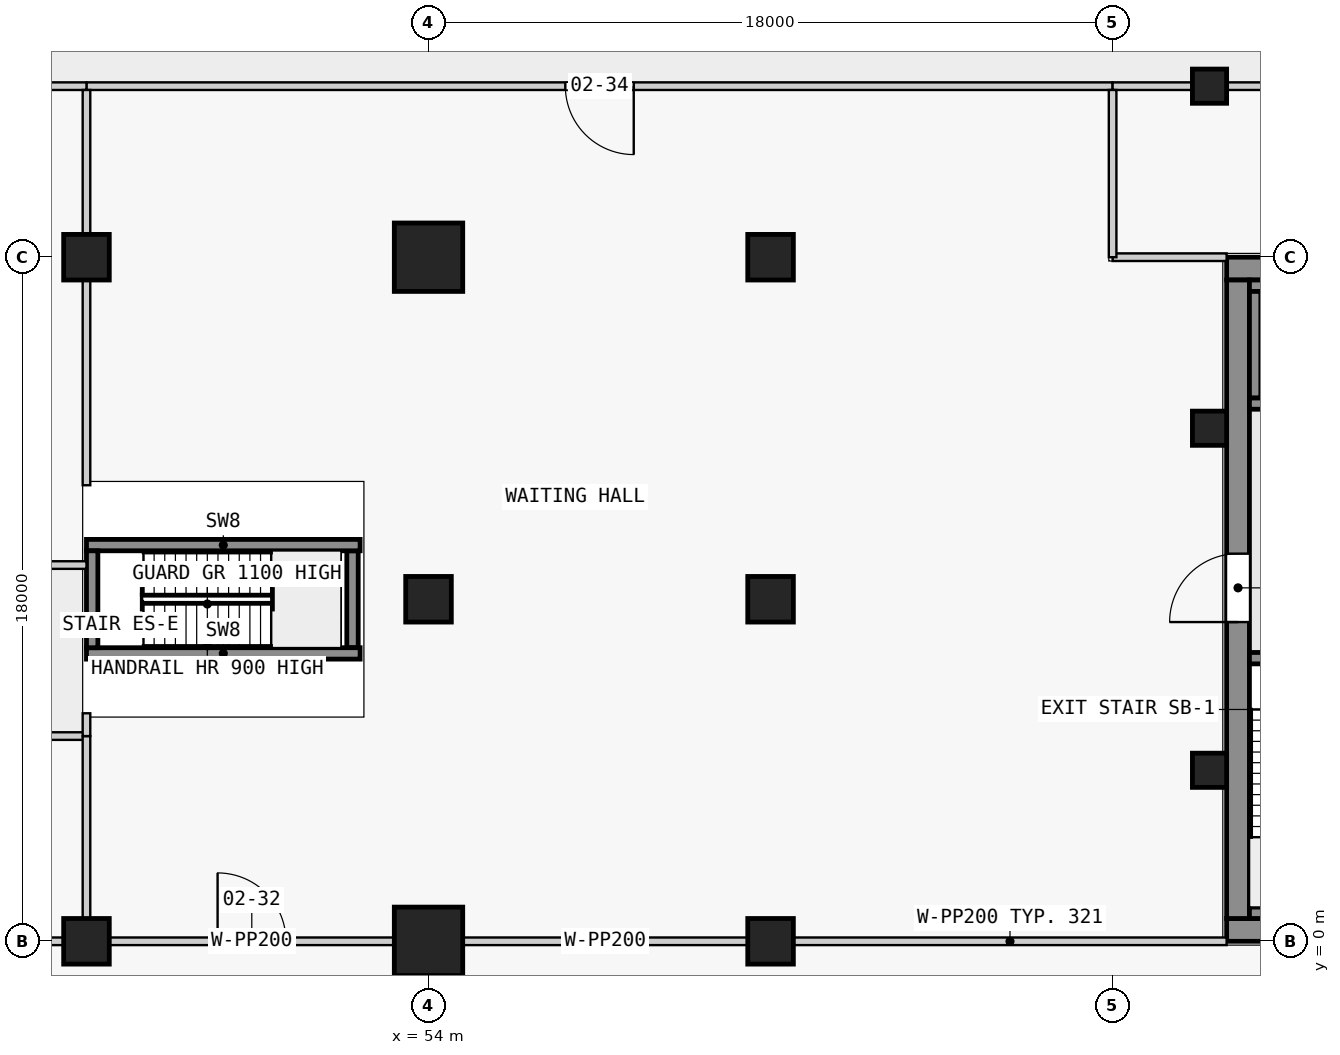
"""IFC4 building model, lengths in metres.
Left out: names, types, materials, properties, quantities, classifications, styles, units other than length and angle.
Written with IfcOpenShell. Run it as: python <this file> out.ifc"""

import sys

from ifc_helpers import new_model, si_unit, direction, frame, frame_2d, origin, origin_2d, place, context, subcontext, project, spatial, rectangle, extrude, element, fill, save


model = new_model("IFC4")
c1 = context("Model", 3, precision=1e-05, world=origin(), true_north=direction((0.0, 1.0)))
c2 = subcontext(c1, "Body", "Model", "MODEL_VIEW")
j1 = project(units=[si_unit("LENGTHUNIT", "METRE"), si_unit("PLANEANGLEUNIT", "RADIAN")], contexts=[c1])
p1 = place(None, origin())
s1 = spatial("IfcSite", under=j1, at=p1, CompositionType="ELEMENT")
p2 = place(p1, origin())
s2 = spatial("IfcBuilding", under=s1, at=p2, CompositionType="ELEMENT")
p3 = place(p2, frame((0.0, 0.0, 12.8)))
s3 = spatial("IfcBuildingStorey", under=s2, at=p3, CompositionType="ELEMENT", Elevation=12.8)
for number, where, z_axis, x_axis in (
    (1, (45.0, 0.0, 0.0), (0.0, 0.0, 1.0), (1.0, 0.0, 0.0)),
    (2, (45.0, 18.0, 0.0), (0.0, 0.0, 1.0), (1.0, 0.0, 0.0)),
):
    element("IfcColumn", number, at=place(p3, frame(where, z_axis=z_axis, x_axis=x_axis)), inside=s3, PredefinedType="COLUMN", context=c2, shape_type="SweptSolid", body=[
        extrude(rectangle(XDim=1.2, YDim=1.2, at=origin_2d()), origin(), (0.0, 0.0, 1.0), 4.5),
    ])
p4 = place(p3, frame((54.0, 0.0, 0.0), z_axis=(0.0, 0.0, 1.0), x_axis=(1.0, 0.0, 0.0)))
e3 = element("IfcColumn", 3, at=p4, inside=s3, PredefinedType="COLUMN", context=c2, shape_type="SweptSolid", body=[
    extrude(rectangle(XDim=1.8, YDim=1.8, at=origin_2d()), origin(), (0.0, 0.0, 1.0), 4.5),
])
p5 = place(p3, frame((54.0, 9.0, 0.0), z_axis=(0.0, 0.0, 1.0), x_axis=(1.0, 0.0, 0.0)))
e4 = element("IfcColumn", 4, at=p5, inside=s3, PredefinedType="COLUMN", context=c2, shape_type="SweptSolid", body=[
    extrude(rectangle(XDim=1.2, YDim=1.2, at=origin_2d()), origin(), (0.0, 0.0, 1.0), 4.5),
])
p6 = place(p3, frame((54.0, 18.0, 0.0), z_axis=(0.0, 0.0, 1.0), x_axis=(1.0, 0.0, 0.0)))
e5 = element("IfcColumn", 5, at=p6, inside=s3, PredefinedType="COLUMN", context=c2, shape_type="SweptSolid", body=[
    extrude(rectangle(XDim=1.8, YDim=1.8, at=origin_2d()), origin(), (0.0, 0.0, 1.0), 4.5),
])
for number, where, z_axis, x_axis in (
    (6, (63.0, 0.0, 0.0), (0.0, 0.0, 1.0), (1.0, 0.0, 0.0)),
    (7, (63.0, 9.0, 0.0), (0.0, 0.0, 1.0), (1.0, 0.0, 0.0)),
    (8, (63.0, 18.0, 0.0), (0.0, 0.0, 1.0), (1.0, 0.0, 0.0)),
):
    element("IfcColumn", number, at=place(p3, frame(where, z_axis=z_axis, x_axis=x_axis)), inside=s3, PredefinedType="COLUMN", context=c2, shape_type="SweptSolid", body=[
        extrude(rectangle(XDim=1.2, YDim=1.2, at=origin_2d()), origin(), (0.0, 0.0, 1.0), 4.5),
    ])
for number, where, z_axis, x_axis in (
    (9, (74.55, 22.5, 0.0), (0.0, 0.0, 1.0), (1.0, 0.0, 0.0)),
    (10, (74.55, 13.5, 0.0), (0.0, 0.0, 1.0), (1.0, 0.0, 0.0)),
    (11, (74.55, 4.5, 0.0), (0.0, 0.0, 1.0), (1.0, 0.0, 0.0)),
):
    element("IfcColumn", number, at=place(p3, frame(where, z_axis=z_axis, x_axis=x_axis)), inside=s3, PredefinedType="COLUMN", context=c2, shape_type="SweptSolid", body=[
        extrude(rectangle(XDim=0.9, YDim=0.9, at=origin_2d()), origin(), (0.0, 0.0, 1.0), 4.5),
    ])
for number, where, z_axis, x_axis in (
    (12, (75.0, 0.3, 0.0), (0.0, 0.0, 1.0), (1.0, 0.0, 0.0)),
    (13, (75.0, 17.7, 0.0), (0.0, 0.0, 1.0), (1.0, 0.0, 0.0)),
):
    element("IfcWall", number, at=place(p3, frame(where, z_axis=z_axis, x_axis=x_axis)), inside=s3, PredefinedType="SHEAR", context=c2, shape_type="SweptSolid", body=[
        extrude(rectangle(XDim=14.5, YDim=0.6, at=frame_2d((7.25, 0.0))), origin(), (0.0, 0.0, 1.0), 4.15),
    ])
p7 = place(p3, frame((75.3, 0.6, 0.0), z_axis=(0.0, 0.0, 1.0), x_axis=(0.0, 1.0, 0.0)))
e14 = element("IfcWall", 14, at=p7, inside=s3, PredefinedType="SHEAR", context=c2, shape_type="SweptSolid", body=[
    extrude(rectangle(XDim=16.8, YDim=0.6, at=frame_2d((8.4, 0.0))), origin(), (0.0, 0.0, 1.0), 4.15),
])
p8 = place(p7, frame((7.8, 0.0, 0.0)))
e15 = element("IfcOpeningElement", 15, at=p8, cuts=e14, PredefinedType="OPENING", context=c2, shape_type="SweptSolid", body=[
    extrude(rectangle(XDim=1.8, YDim=2.1, at=frame_2d((0.9, 1.05))), frame((0.0, 0.31, 0.0), z_axis=(0.0, -1.0, 0.0), x_axis=(1.0, 0.0, 0.0)), (0.0, 0.0, 1.0), 0.62),
])
p9 = place(p3, frame((75.6, 0.75, 0.0), z_axis=(0.0, 0.0, 1.0), x_axis=(1.0, 0.0, 0.0)))
e16 = element("IfcWall", 16, at=p9, inside=s3, PredefinedType="SHEAR", context=c2, shape_type="SweptSolid", body=[
    extrude(rectangle(XDim=5.7, YDim=0.3, at=frame_2d((2.85, 0.0))), origin(), (0.0, 0.0, 1.0), 4.15),
])
p10 = place(p3, frame((75.6, 7.45, 0.0), z_axis=(0.0, 0.0, 1.0), x_axis=(1.0, 0.0, 0.0)))
e17 = element("IfcWall", 17, at=p10, inside=s3, PredefinedType="SHEAR", context=c2, shape_type="SweptSolid", body=[
    extrude(rectangle(XDim=5.7, YDim=0.3, at=frame_2d((2.85, 0.0))), origin(), (0.0, 0.0, 1.0), 4.15),
])
p11 = place(p10, frame((0.75, 0.0, 0.0)))
e18 = element("IfcOpeningElement", 18, at=p11, cuts=e17, PredefinedType="OPENING", context=c2, shape_type="SweptSolid", body=[
    extrude(rectangle(XDim=1.1, YDim=2.1, at=frame_2d((0.55, 1.05))), frame((0.0, 0.16, 0.0), z_axis=(0.0, -1.0, 0.0), x_axis=(1.0, 0.0, 0.0)), (0.0, 0.0, 1.0), 0.32),
])
p12 = place(p10, frame((3.55, 0.0, 0.0)))
e19 = element("IfcOpeningElement", 19, at=p12, cuts=e17, PredefinedType="OPENING", context=c2, shape_type="SweptSolid", body=[
    extrude(rectangle(XDim=1.1, YDim=2.1, at=frame_2d((0.55, 1.05))), frame((0.0, 0.16, 0.0), z_axis=(0.0, -1.0, 0.0), x_axis=(1.0, 0.0, 0.0)), (0.0, 0.0, 1.0), 0.32),
])
p13 = place(p3, frame((75.6, 17.25, 0.0), z_axis=(0.0, 0.0, 1.0), x_axis=(1.0, 0.0, 0.0)))
e20 = element("IfcWall", 20, at=p13, inside=s3, PredefinedType="SHEAR", context=c2, shape_type="SweptSolid", body=[
    extrude(rectangle(XDim=9.9, YDim=0.3, at=frame_2d((4.95, 0.0))), origin(), (0.0, 0.0, 1.0), 4.15),
])
p14 = place(p3, frame((75.6, 14.15, 0.0), z_axis=(0.0, 0.0, 1.0), x_axis=(1.0, 0.0, 0.0)))
e21 = element("IfcWall", 21, at=p14, inside=s3, PredefinedType="SHEAR", context=c2, shape_type="SweptSolid", body=[
    extrude(rectangle(XDim=9.9, YDim=0.3, at=frame_2d((4.95, 0.0))), origin(), (0.0, 0.0, 1.0), 4.15),
])
p15 = place(p14, frame((0.85, 0.0, 0.0)))
e22 = element("IfcOpeningElement", 22, at=p15, cuts=e21, PredefinedType="OPENING", context=c2, shape_type="SweptSolid", body=[
    extrude(rectangle(XDim=1.1, YDim=2.1, at=frame_2d((0.55, 1.05))), frame((0.0, 0.16, 0.0), z_axis=(0.0, -1.0, 0.0), x_axis=(1.0, 0.0, 0.0)), (0.0, 0.0, 1.0), 0.32),
])
p16 = place(p14, frame((3.35, 0.0, 0.0)))
e23 = element("IfcOpeningElement", 23, at=p16, cuts=e21, PredefinedType="OPENING", context=c2, shape_type="SweptSolid", body=[
    extrude(rectangle(XDim=1.1, YDim=2.1, at=frame_2d((0.55, 1.05))), frame((0.0, 0.16, 0.0), z_axis=(0.0, -1.0, 0.0), x_axis=(1.0, 0.0, 0.0)), (0.0, 0.0, 1.0), 0.32),
])
p17 = place(p14, frame((5.75, 0.0, 0.0)))
e24 = element("IfcOpeningElement", 24, at=p17, cuts=e21, PredefinedType="OPENING", context=c2, shape_type="SweptSolid", body=[
    extrude(rectangle(XDim=1.1, YDim=2.1, at=frame_2d((0.55, 1.05))), frame((0.0, 0.16, 0.0), z_axis=(0.0, -1.0, 0.0), x_axis=(1.0, 0.0, 0.0)), (0.0, 0.0, 1.0), 0.32),
])
p18 = place(p14, frame((8.05, 0.0, 0.0)))
e25 = element("IfcOpeningElement", 25, at=p18, cuts=e21, PredefinedType="OPENING", context=c2, shape_type="SweptSolid", body=[
    extrude(rectangle(XDim=1.1, YDim=2.1, at=frame_2d((0.55, 1.05))), frame((0.0, 0.16, 0.0), z_axis=(0.0, -1.0, 0.0), x_axis=(1.0, 0.0, 0.0)), (0.0, 0.0, 1.0), 0.32),
])
p19 = place(p3, frame((75.75, 14.3, 0.0), z_axis=(0.0, 0.0, 1.0), x_axis=(0.0, 1.0, 0.0)))
e26 = element("IfcWall", 26, at=p19, inside=s3, PredefinedType="SHEAR", context=c2, shape_type="SweptSolid", body=[
    extrude(rectangle(XDim=2.8, YDim=0.3, at=frame_2d((1.4, 0.0))), origin(), (0.0, 0.0, 1.0), 4.15),
])
for number, where, z_axis, x_axis in (
    (27, (45.15, 7.725, 0.0), (0.0, 0.0, 1.0), (0.0, 1.0, 0.0)),
    (28, (52.0, 7.725, 0.0), (0.0, 0.0, 1.0), (0.0, 1.0, 0.0)),
):
    element("IfcWall", number, at=place(p3, frame(where, z_axis=z_axis, x_axis=x_axis)), inside=s3, PredefinedType="SHEAR", context=c2, shape_type="SweptSolid", body=[
        extrude(rectangle(XDim=2.55, YDim=0.3, at=frame_2d((1.275, 0.0))), origin(), (0.0, 0.0, 1.0), 4.5),
    ])
for number, where, z_axis, x_axis in (
    (29, (45.0, 7.575, 0.0), (0.0, 0.0, 1.0), (1.0, 0.0, 0.0)),
    (30, (45.0, 10.425, 0.0), (0.0, 0.0, 1.0), (1.0, 0.0, 0.0)),
):
    element("IfcWall", number, at=place(p3, frame(where, z_axis=z_axis, x_axis=x_axis)), inside=s3, PredefinedType="SHEAR", context=c2, shape_type="SweptSolid", body=[
        extrude(rectangle(XDim=7.2, YDim=0.3, at=frame_2d((3.6, 0.0))), origin(), (0.0, 0.0, 1.0), 4.5),
    ])
p20 = place(p3, frame((45.6, 0.0, 0.0), z_axis=(0.0, 0.0, 1.0), x_axis=(1.0, 0.0, 0.0)))
e31 = element("IfcWall", 31, at=p20, inside=s3, PredefinedType="PARTITIONING", context=c2, shape_type="SweptSolid", body=[
    extrude(rectangle(XDim=7.5, YDim=0.2, at=frame_2d((3.75, 0.0))), origin(), (0.0, 0.0, 1.0), 3.45),
])
p21 = place(p20, frame((2.85, 0.0, 0.0)))
e32 = element("IfcOpeningElement", 32, at=p21, cuts=e31, PredefinedType="OPENING", context=c2, shape_type="SweptSolid", body=[
    extrude(rectangle(XDim=1.8, YDim=2.1, at=frame_2d((0.9, 1.05))), frame((0.0, 0.11, 0.0), z_axis=(0.0, -1.0, 0.0), x_axis=(1.0, 0.0, 0.0)), (0.0, 0.0, 1.0), 0.22),
])
p22 = place(p3, frame((54.9, 0.0, 0.0), z_axis=(0.0, 0.0, 1.0), x_axis=(1.0, 0.0, 0.0)))
e33 = element("IfcWall", 33, at=p22, inside=s3, PredefinedType="PARTITIONING", context=c2, shape_type="SweptSolid", body=[
    extrude(rectangle(XDim=7.5, YDim=0.2, at=frame_2d((3.75, 0.0))), origin(), (0.0, 0.0, 1.0), 3.45),
])
p23 = place(p3, frame((63.6, 0.0, 0.0), z_axis=(0.0, 0.0, 1.0), x_axis=(1.0, 0.0, 0.0)))
e34 = element("IfcWall", 34, at=p23, inside=s3, PredefinedType="PARTITIONING", context=c2, shape_type="SweptSolid", body=[
    extrude(rectangle(XDim=11.4, YDim=0.2, at=frame_2d((5.7, 0.0))), origin(), (0.0, 0.0, 1.0), 4.15),
])
p24 = place(p3, frame((72.0, 22.5, 0.0), z_axis=(0.0, 0.0, 1.0), x_axis=(-1.0, 0.0, 0.0)))
e35 = element("IfcWall", 35, at=p24, inside=s3, PredefinedType="PARTITIONING", context=c2, shape_type="SweptSolid", body=[
    extrude(rectangle(XDim=27.0, YDim=0.2, at=frame_2d((13.5, 0.0))), origin(), (0.0, 0.0, 1.0), 3.45),
])
p25 = place(p24, frame((12.6, 0.0, 0.0)))
e36 = element("IfcOpeningElement", 36, at=p25, cuts=e35, PredefinedType="OPENING", context=c2, shape_type="SweptSolid", body=[
    extrude(rectangle(XDim=1.8, YDim=2.1, at=frame_2d((0.9, 1.05))), frame((0.0, 0.11, 0.0), z_axis=(0.0, -1.0, 0.0), x_axis=(1.0, 0.0, 0.0)), (0.0, 0.0, 1.0), 0.22),
])
p26 = place(p3, frame((82.05, 22.5, 0.0), z_axis=(0.0, 0.0, 1.0), x_axis=(-1.0, 0.0, 0.0)))
e37 = element("IfcWall", 37, at=p26, inside=s3, PredefinedType="PARTITIONING", context=c2, shape_type="SweptSolid", body=[
    extrude(rectangle(XDim=7.05, YDim=0.2, at=frame_2d((3.525, 0.0))), origin(), (0.0, 0.0, 1.0), 4.15),
])
p27 = place(p3, frame((74.1, 22.5, 0.0), z_axis=(0.0, 0.0, 1.0), x_axis=(-1.0, 0.0, 0.0)))
e38 = element("IfcWall", 38, at=p27, inside=s3, PredefinedType="PARTITIONING", context=c2, shape_type="SweptSolid", body=[
    extrude(rectangle(XDim=2.1, YDim=0.2, at=frame_2d((1.05, 0.0))), origin(), (0.0, 0.0, 1.0), 4.15),
])
p28 = place(p3, frame((45.0, 22.5, 0.0), z_axis=(0.0, 0.0, 1.0), x_axis=(-1.0, 0.0, 0.0)))
e39 = element("IfcWall", 39, at=p28, inside=s3, PredefinedType="PARTITIONING", context=c2, shape_type="SweptSolid", body=[
    extrude(rectangle(XDim=18.0, YDim=0.2, at=frame_2d((9.0, 0.0))), origin(), (0.0, 0.0, 1.0), 3.45),
])
p29 = place(p28, frame((8.1, 0.0, 0.0)))
e40 = element("IfcOpeningElement", 40, at=p29, cuts=e39, PredefinedType="OPENING", context=c2, shape_type="SweptSolid", body=[
    extrude(rectangle(XDim=1.8, YDim=2.1, at=frame_2d((0.9, 1.05))), frame((0.0, 0.11, 0.0), z_axis=(0.0, -1.0, 0.0), x_axis=(1.0, 0.0, 0.0)), (0.0, 0.0, 1.0), 0.22),
])
p30 = place(p3, frame((36.9, 0.0, 0.0), z_axis=(0.0, 0.0, 1.0), x_axis=(1.0, 0.0, 0.0)))
e41 = element("IfcWall", 41, at=p30, inside=s3, PredefinedType="PARTITIONING", context=c2, shape_type="SweptSolid", body=[
    extrude(rectangle(XDim=7.5, YDim=0.2, at=frame_2d((3.75, 0.0))), origin(), (0.0, 0.0, 1.0), 3.45),
])
p31 = place(p3, frame((27.0, 9.9, 0.0), z_axis=(0.0, 0.0, 1.0), x_axis=(1.0, 0.0, 0.0)))
e42 = element("IfcWall", 42, at=p31, inside=s3, PredefinedType="PARTITIONING", context=c2, shape_type="SweptSolid", body=[
    extrude(rectangle(XDim=18.0, YDim=0.2, at=frame_2d((9.0, 0.0))), origin(), (0.0, 0.0, 1.0), 3.45),
])
p32 = place(p31, frame((6.35, 0.0, 0.0)))
e43 = element("IfcOpeningElement", 43, at=p32, cuts=e42, PredefinedType="OPENING", context=c2, shape_type="SweptSolid", body=[
    extrude(rectangle(XDim=1.8, YDim=2.1, at=frame_2d((0.9, 1.05))), frame((0.0, 0.11, 0.0), z_axis=(0.0, -1.0, 0.0), x_axis=(1.0, 0.0, 0.0)), (0.0, 0.0, 1.0), 0.22),
])
p33 = place(p3, frame((45.0, 5.4, 0.0), z_axis=(0.0, 0.0, 1.0), x_axis=(-1.0, 0.0, 0.0)))
e44 = element("IfcWall", 44, at=p33, inside=s3, PredefinedType="PARTITIONING", context=c2, shape_type="SweptSolid", body=[
    extrude(rectangle(XDim=18.0, YDim=0.2, at=frame_2d((9.0, 0.0))), origin(), (0.0, 0.0, 1.0), 3.45),
])
p34 = place(p3, frame((45.0, 22.4, 0.0), z_axis=(0.0, 0.0, 1.0), x_axis=(0.0, -1.0, 0.0)))
e45 = element("IfcWall", 45, at=p34, inside=s3, PredefinedType="PARTITIONING", context=c2, shape_type="SweptSolid", body=[
    extrude(rectangle(XDim=3.8, YDim=0.2, at=frame_2d((1.9, 0.0))), origin(), (0.0, 0.0, 1.0), 3.45),
])
p35 = place(p3, frame((45.0, 17.4, 0.0), z_axis=(0.0, 0.0, 1.0), x_axis=(0.0, -1.0, 0.0)))
e46 = element("IfcWall", 46, at=p35, inside=s3, PredefinedType="PARTITIONING", context=c2, shape_type="SweptSolid", body=[
    extrude(rectangle(XDim=5.4, YDim=0.2, at=frame_2d((2.7, 0.0))), origin(), (0.0, 0.0, 1.0), 4.15),
])
p36 = place(p3, frame((75.0, 18.0, 0.0), z_axis=(0.0, 0.0, 1.0), x_axis=(-1.0, 0.0, 0.0)))
e47 = element("IfcWall", 47, at=p36, inside=s3, PredefinedType="PARTITIONING", context=c2, shape_type="SweptSolid", body=[
    extrude(rectangle(XDim=3.0, YDim=0.2, at=frame_2d((1.5, 0.0))), origin(), (0.0, 0.0, 1.0), 4.15),
])
p37 = place(p3, frame((72.0, 18.0, 0.0), z_axis=(0.0, 0.0, 1.0), x_axis=(0.0, 1.0, 0.0)))
e48 = element("IfcWall", 48, at=p37, inside=s3, PredefinedType="PARTITIONING", context=c2, shape_type="SweptSolid", body=[
    extrude(rectangle(XDim=4.4, YDim=0.2, at=frame_2d((2.2, 0.0))), origin(), (0.0, 0.0, 1.0), 4.15),
])
p38 = place(p3, frame((45.0, 5.4, 0.0), z_axis=(0.0, 0.0, 1.0), x_axis=(0.0, -1.0, 0.0)))
e49 = element("IfcWall", 49, at=p38, inside=s3, PredefinedType="PARTITIONING", context=c2, shape_type="SweptSolid", body=[
    extrude(rectangle(XDim=4.8, YDim=0.2, at=frame_2d((2.4, 0.0))), origin(), (0.0, 0.0, 1.0), 4.15),
])
p39 = place(p3, frame((45.0, 6.0, 0.0), z_axis=(0.0, 0.0, 1.0), x_axis=(0.0, -1.0, 0.0)))
e50 = element("IfcWall", 50, at=p39, inside=s3, PredefinedType="PARTITIONING", context=c2, shape_type="SweptSolid", body=[
    extrude(rectangle(XDim=0.6, YDim=0.2, at=frame_2d((0.3, 0.0))), origin(), (0.0, 0.0, 1.0), 4.15),
])
p40 = place(p8, origin())
e51 = element("IfcDoor", 51, at=p40, inside=s3, OperationType="DOUBLE_DOOR_SINGLE_SWING", PredefinedType="DOOR", context=c2, shape_type="SweptSolid", body=[
    extrude(rectangle(XDim=1.8, YDim=2.1, at=frame_2d((0.9, 1.05))), frame((0.0, 0.025, 0.0), z_axis=(0.0, -1.0, 0.0), x_axis=(1.0, 0.0, 0.0)), (0.0, 0.0, 1.0), 0.05),
])
fill(e15, e51)
p41 = place(p21, origin())
e52 = element("IfcDoor", 52, at=p41, inside=s3, OperationType="DOUBLE_DOOR_SINGLE_SWING", PredefinedType="DOOR", context=c2, shape_type="SweptSolid", body=[
    extrude(rectangle(XDim=1.8, YDim=2.1, at=frame_2d((0.9, 1.05))), frame((0.0, 0.025, 0.0), z_axis=(0.0, -1.0, 0.0), x_axis=(1.0, 0.0, 0.0)), (0.0, 0.0, 1.0), 0.05),
])
fill(e32, e52)
p42 = place(p25, origin())
e53 = element("IfcDoor", 53, at=p42, inside=s3, OperationType="DOUBLE_DOOR_SINGLE_SWING", PredefinedType="DOOR", context=c2, shape_type="SweptSolid", body=[
    extrude(rectangle(XDim=1.8, YDim=2.1, at=frame_2d((0.9, 1.05))), frame((0.0, 0.025, 0.0), z_axis=(0.0, -1.0, 0.0), x_axis=(1.0, 0.0, 0.0)), (0.0, 0.0, 1.0), 0.05),
])
fill(e36, e53)
save(model, sys.argv[1])
